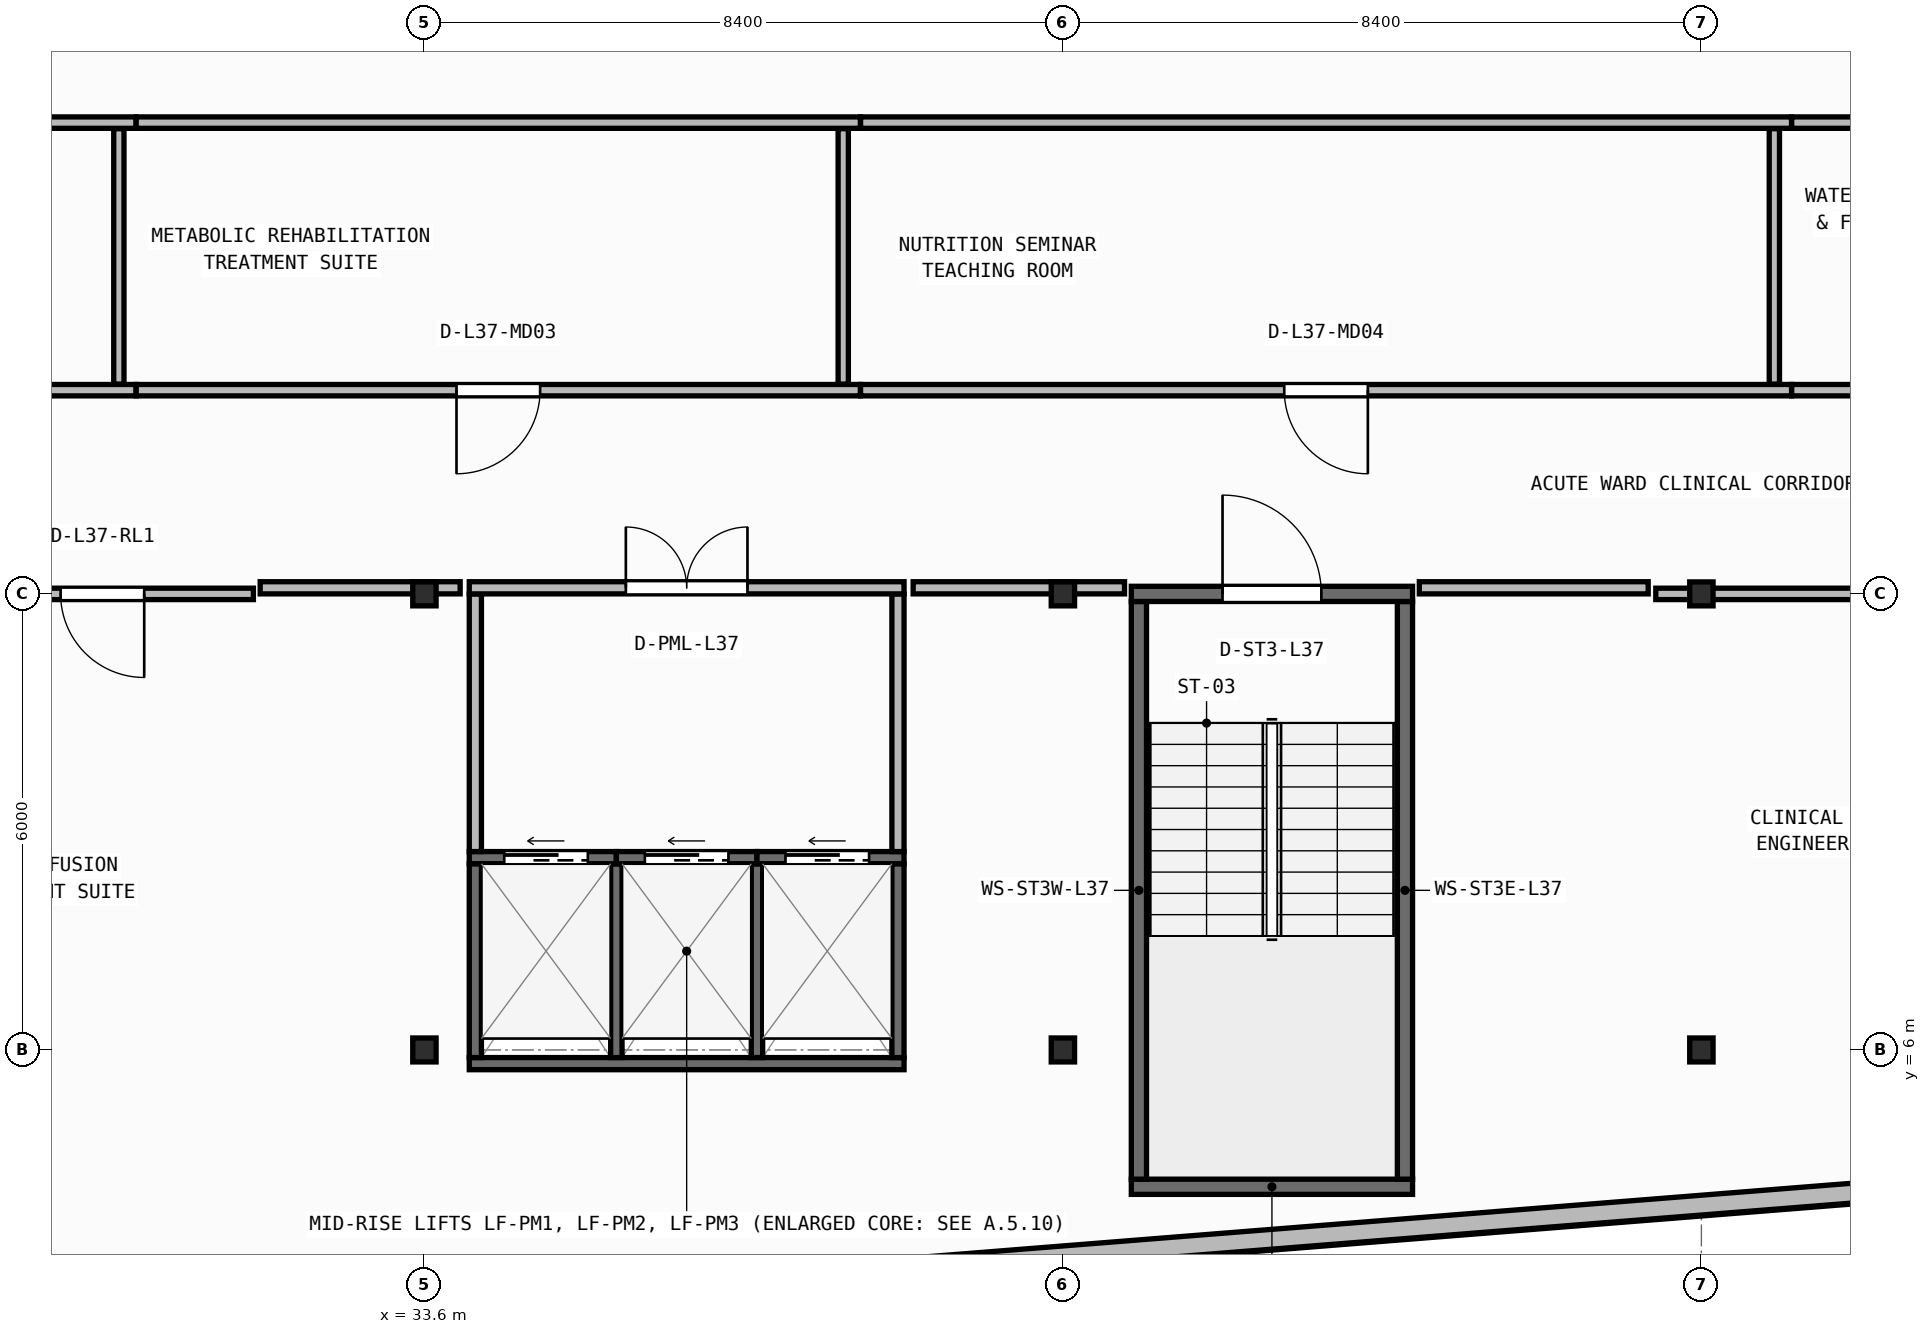
"""IFC4 building model, lengths in metres.
Left out: names, types, materials, properties, quantities, classifications, styles, units other than length and angle.
Written with IfcOpenShell. Run it as: python <this file> out.ifc"""

import sys

from ifc_helpers import new_model, si_unit, direction, frame, frame_2d, origin, origin_2d, place, context, subcontext, project, spatial, rectangle, i_section, extrude, element, fill, save


model = new_model("IFC4")
c1 = context("Model", 3, precision=1e-05, world=origin(), true_north=direction((0.0, 1.0)))
c2 = subcontext(c1, "Body", "Model", "MODEL_VIEW")
j1 = project(units=[si_unit("LENGTHUNIT", "METRE"), si_unit("PLANEANGLEUNIT", "RADIAN")], contexts=[c1])
p1 = place(None, origin())
s1 = spatial("IfcSite", under=j1, at=p1, CompositionType="ELEMENT")
p2 = place(p1, origin())
s2 = spatial("IfcBuilding", under=s1, at=p2, CompositionType="ELEMENT")
p3 = place(p2, frame((0.0, 0.0, 150.75)))
s3 = spatial("IfcBuildingStorey", under=s2, at=p3, CompositionType="ELEMENT", Elevation=150.75)
for number, where, z_axis, x_axis in (
    (1, (33.6, 6.0, 0.0), (0.0, 0.0, 1.0), (1.0, 0.0, 0.0)),
    (2, (42.0, 6.0, 0.0), (0.0, 0.0, 1.0), (1.0, 0.0, 0.0)),
    (3, (50.4, 6.0, 0.0), (0.0, 0.0, 1.0), (1.0, 0.0, 0.0)),
    (4, (33.6, 12.0, 0.0), (0.0, 0.0, 1.0), (1.0, 0.0, 0.0)),
    (5, (42.0, 12.0, 0.0), (0.0, 0.0, 1.0), (1.0, 0.0, 0.0)),
    (6, (50.4, 12.0, 0.0), (0.0, 0.0, 1.0), (1.0, 0.0, 0.0)),
):
    element("IfcColumn", number, at=place(p3, frame(where, z_axis=z_axis, x_axis=x_axis)), inside=s3, PredefinedType="COLUMN", context=c2, shape_type="SweptSolid", body=[
        extrude(i_section(OverallWidth=0.307, OverallDepth=0.315, WebThickness=0.012, FlangeThickness=0.019, FilletRadius=0.017, at=origin_2d()), origin(), (0.0, 0.0, 1.0), 3.95),
    ])
p4 = place(p3, frame((2.76, 0.173, 0.0), z_axis=(0.0, 0.0, 1.0), x_axis=(0.996857931723, 0.079210251617, 0.0)))
e7 = element("IfcWall", 7, at=p4, inside=s3, PredefinedType="STANDARD", context=c2, shape_type="SweptSolid", body=[
    extrude(rectangle(XDim=51.442, YDim=0.26, at=frame_2d((25.721, 0.0))), origin(), (0.0, 0.0, 1.0), 3.71),
])
p5 = place(p4, frame((24.521, 0.0, 0.9)))
e8 = element("IfcOpeningElement", 8, at=p5, cuts=e7, PredefinedType="OPENING", context=c2, shape_type="SweptSolid", body=[
    extrude(rectangle(XDim=2.4, YDim=1.65, at=frame_2d((1.2, 0.825))), frame((0.0, 0.14, 0.0), z_axis=(0.0, -1.0, 0.0), x_axis=(1.0, 0.0, 0.0)), (0.0, 0.0, 1.0), 0.28),
])
p6 = place(p3, frame((42.9, 4.2, 0.0), z_axis=(0.0, 0.0, 1.0), x_axis=(1.0, 0.0, 0.0)))
e9 = element("IfcWall", 9, at=p6, inside=s3, PredefinedType="SHEAR", context=c2, shape_type="SweptSolid", body=[
    extrude(rectangle(XDim=3.7, YDim=0.2, at=frame_2d((1.85, 0.0))), origin(), (0.0, 0.0, 1.0), 3.71),
])
for number, where, z_axis, x_axis in (
    (10, (43.0, 4.3, 0.0), (0.0, 0.0, 1.0), (0.0, 1.0, 0.0)),
    (11, (46.5, 4.3, 0.0), (0.0, 0.0, 1.0), (0.0, 1.0, 0.0)),
):
    element("IfcWall", number, at=place(p3, frame(where, z_axis=z_axis, x_axis=x_axis)), inside=s3, PredefinedType="SHEAR", context=c2, shape_type="SweptSolid", body=[
        extrude(rectangle(XDim=7.6, YDim=0.2, at=frame_2d((3.8, 0.0))), origin(), (0.0, 0.0, 1.0), 3.71),
    ])
p7 = place(p3, frame((42.9, 12.0, 0.0), z_axis=(0.0, 0.0, 1.0), x_axis=(1.0, 0.0, 0.0)))
e12 = element("IfcWall", 12, at=p7, inside=s3, PredefinedType="SHEAR", context=c2, shape_type="SweptSolid", body=[
    extrude(rectangle(XDim=3.7, YDim=0.2, at=frame_2d((1.85, 0.0))), origin(), (0.0, 0.0, 1.0), 3.71),
])
p8 = place(p7, frame((1.2, 0.0, 0.0)))
e13 = element("IfcOpeningElement", 13, at=p8, cuts=e12, PredefinedType="OPENING", context=c2, shape_type="SweptSolid", body=[
    extrude(rectangle(XDim=1.3, YDim=2.15, at=frame_2d((0.65, 1.075))), frame((0.0, 0.11, 0.0), z_axis=(0.0, -1.0, 0.0), x_axis=(1.0, 0.0, 0.0)), (0.0, 0.0, 1.0), 0.22),
])
p9 = place(p3, frame((34.19, 5.82, 0.0), z_axis=(0.0, 0.0, 1.0), x_axis=(1.0, 0.0, 0.0)))
e14 = element("IfcWall", 14, at=p9, inside=s3, PredefinedType="SHEAR", context=c2, shape_type="SweptSolid", body=[
    extrude(rectangle(XDim=5.72, YDim=0.16, at=frame_2d((2.86, 0.0))), origin(), (0.0, 0.0, 1.0), 3.71),
])
for number, where, z_axis, x_axis in (
    (15, (34.27, 5.9, 0.0), (0.0, 0.0, 1.0), (0.0, 1.0, 0.0)),
    (16, (39.83, 5.9, 0.0), (0.0, 0.0, 1.0), (0.0, 1.0, 0.0)),
):
    element("IfcWall", number, at=place(p3, frame(where, z_axis=z_axis, x_axis=x_axis)), inside=s3, PredefinedType="SHEAR", context=c2, shape_type="SweptSolid", body=[
        extrude(rectangle(XDim=2.55, YDim=0.16, at=frame_2d((1.275, 0.0))), origin(), (0.0, 0.0, 1.0), 3.71),
    ])
for number, where, z_axis, x_axis in (
    (17, (36.125, 5.9, 0.0), (0.0, 0.0, 1.0), (0.0, 1.0, 0.0)),
    (18, (37.975, 5.9, 0.0), (0.0, 0.0, 1.0), (0.0, 1.0, 0.0)),
):
    element("IfcWall", number, at=place(p3, frame(where, z_axis=z_axis, x_axis=x_axis)), inside=s3, PredefinedType="SHEAR", context=c2, shape_type="SweptSolid", body=[
        extrude(rectangle(XDim=2.55, YDim=0.15, at=frame_2d((1.275, 0.0))), origin(), (0.0, 0.0, 1.0), 3.71),
    ])
p10 = place(p3, frame((34.19, 8.53, 0.0), z_axis=(0.0, 0.0, 1.0), x_axis=(1.0, 0.0, 0.0)))
e19 = element("IfcWall", 19, at=p10, inside=s3, PredefinedType="SHEAR", context=c2, shape_type="SweptSolid", body=[
    extrude(rectangle(XDim=1.935, YDim=0.16, at=frame_2d((0.968, 0.0))), origin(), (0.0, 0.0, 1.0), 3.71),
])
p11 = place(p10, frame((0.46, 0.0, 0.0)))
e20 = element("IfcOpeningElement", 20, at=p11, cuts=e19, PredefinedType="OPENING", context=c2, shape_type="SweptSolid", body=[
    extrude(rectangle(XDim=1.1, YDim=2.15, at=frame_2d((0.55, 1.075))), frame((0.0, 0.09, 0.0), z_axis=(0.0, -1.0, 0.0), x_axis=(1.0, 0.0, 0.0)), (0.0, 0.0, 1.0), 0.18),
])
p12 = place(p3, frame((36.125, 8.53, 0.0), z_axis=(0.0, 0.0, 1.0), x_axis=(1.0, 0.0, 0.0)))
e21 = element("IfcWall", 21, at=p12, inside=s3, PredefinedType="SHEAR", context=c2, shape_type="SweptSolid", body=[
    extrude(rectangle(XDim=1.85, YDim=0.16, at=frame_2d((0.925, 0.0))), origin(), (0.0, 0.0, 1.0), 3.71),
])
p13 = place(p12, frame((0.375, 0.0, 0.0)))
e22 = element("IfcOpeningElement", 22, at=p13, cuts=e21, PredefinedType="OPENING", context=c2, shape_type="SweptSolid", body=[
    extrude(rectangle(XDim=1.1, YDim=2.15, at=frame_2d((0.55, 1.075))), frame((0.0, 0.09, 0.0), z_axis=(0.0, -1.0, 0.0), x_axis=(1.0, 0.0, 0.0)), (0.0, 0.0, 1.0), 0.18),
])
p14 = place(p3, frame((37.975, 8.53, 0.0), z_axis=(0.0, 0.0, 1.0), x_axis=(1.0, 0.0, 0.0)))
e23 = element("IfcWall", 23, at=p14, inside=s3, PredefinedType="SHEAR", context=c2, shape_type="SweptSolid", body=[
    extrude(rectangle(XDim=1.935, YDim=0.16, at=frame_2d((0.967, 0.0))), origin(), (0.0, 0.0, 1.0), 3.71),
])
p15 = place(p14, frame((0.375, 0.0, 0.0)))
e24 = element("IfcOpeningElement", 24, at=p15, cuts=e23, PredefinedType="OPENING", context=c2, shape_type="SweptSolid", body=[
    extrude(rectangle(XDim=1.1, YDim=2.15, at=frame_2d((0.55, 1.075))), frame((0.0, 0.09, 0.0), z_axis=(0.0, -1.0, 0.0), x_axis=(1.0, 0.0, 0.0)), (0.0, 0.0, 1.0), 0.18),
])
for number, where, z_axis, x_axis in (
    (25, (34.27, 8.61, 0.0), (0.0, 0.0, 1.0), (0.0, 1.0, 0.0)),
    (26, (39.83, 8.61, 0.0), (0.0, 0.0, 1.0), (0.0, 1.0, 0.0)),
):
    element("IfcWall", number, at=place(p3, frame(where, z_axis=z_axis, x_axis=x_axis)), inside=s3, PredefinedType="PARTITIONING", context=c2, shape_type="SweptSolid", body=[
        extrude(rectangle(XDim=3.39, YDim=0.16, at=frame_2d((1.695, 0.0))), origin(), (0.0, 0.0, 1.0), 3.71),
    ])
p16 = place(p3, frame((34.19, 12.08, 0.0), z_axis=(0.0, 0.0, 1.0), x_axis=(1.0, 0.0, 0.0)))
e27 = element("IfcWall", 27, at=p16, inside=s3, PredefinedType="PARTITIONING", context=c2, shape_type="SweptSolid", body=[
    extrude(rectangle(XDim=5.72, YDim=0.16, at=frame_2d((2.86, 0.0))), origin(), (0.0, 0.0, 1.0), 3.083),
])
p17 = place(p16, frame((2.06, 0.0, 0.0)))
e28 = element("IfcOpeningElement", 28, at=p17, cuts=e27, PredefinedType="OPENING", context=c2, shape_type="SweptSolid", body=[
    extrude(rectangle(XDim=1.6, YDim=2.05, at=frame_2d((0.8, 1.025))), frame((0.0, 0.09, 0.0), z_axis=(0.0, -1.0, 0.0), x_axis=(1.0, 0.0, 0.0)), (0.0, 0.0, 1.0), 0.18),
])
p18 = place(p3, frame((31.35, 12.0, 0.0), z_axis=(0.0, 0.0, 1.0), x_axis=(-1.0, 0.0, 0.0)))
e29 = element("IfcWall", 29, at=p18, inside=s3, PredefinedType="PARTITIONING", context=c2, shape_type="SweptSolid", body=[
    extrude(rectangle(XDim=5.997, YDim=0.15, at=frame_2d((2.998, 0.0))), origin(), (0.0, 0.0, 1.0), 3.083),
])
p19 = place(p18, frame((1.437, 0.0, 0.0)))
e30 = element("IfcOpeningElement", 30, at=p19, cuts=e29, PredefinedType="OPENING", context=c2, shape_type="SweptSolid", body=[
    extrude(rectangle(XDim=1.1, YDim=2.1, at=frame_2d((0.55, 1.05))), frame((0.0, 0.085, 0.0), z_axis=(0.0, -1.0, 0.0), x_axis=(1.0, 0.0, 0.0)), (0.0, 0.0, 1.0), 0.17),
])
p20 = place(p3, frame((56.52, 12.0, 0.0), z_axis=(0.0, 0.0, 1.0), x_axis=(-1.0, 0.0, 0.0)))
e31 = element("IfcWall", 31, at=p20, inside=s3, PredefinedType="PARTITIONING", context=c2, shape_type="SweptSolid", body=[
    extrude(rectangle(XDim=6.72, YDim=0.15, at=frame_2d((3.36, 0.0))), origin(), (0.0, 0.0, 1.0), 3.083),
])
p21 = place(p20, frame((0.331, 0.0, 0.0)))
e32 = element("IfcOpeningElement", 32, at=p21, cuts=e31, PredefinedType="OPENING", context=c2, shape_type="SweptSolid", body=[
    extrude(rectangle(XDim=1.1, YDim=2.1, at=frame_2d((0.55, 1.05))), frame((0.0, 0.085, 0.0), z_axis=(0.0, -1.0, 0.0), x_axis=(1.0, 0.0, 0.0)), (0.0, 0.0, 1.0), 0.17),
])
p22 = place(p3, frame((29.806, 14.68, 0.0), z_axis=(0.0, 0.0, 1.0), x_axis=(-1.0, 0.0, 0.0)))
e33 = element("IfcWall", 33, at=p22, inside=s3, PredefinedType="PARTITIONING", context=c2, shape_type="SweptSolid", body=[
    extrude(rectangle(XDim=8.252, YDim=0.15, at=frame_2d((4.126, 0.0))), origin(), (0.0, 0.0, 1.0), 3.71),
])
p23 = place(p22, frame((3.576, 0.0, 0.0)))
e34 = element("IfcOpeningElement", 34, at=p23, cuts=e33, PredefinedType="OPENING", context=c2, shape_type="SweptSolid", body=[
    extrude(rectangle(XDim=1.1, YDim=2.1, at=frame_2d((0.55, 1.05))), frame((0.0, 0.085, 0.0), z_axis=(0.0, -1.0, 0.0), x_axis=(1.0, 0.0, 0.0)), (0.0, 0.0, 1.0), 0.17),
])
p24 = place(p3, frame((39.336, 14.68, 0.0), z_axis=(0.0, 0.0, 1.0), x_axis=(-1.0, 0.0, 0.0)))
e35 = element("IfcWall", 35, at=p24, inside=s3, PredefinedType="PARTITIONING", context=c2, shape_type="SweptSolid", body=[
    extrude(rectangle(XDim=9.528, YDim=0.15, at=frame_2d((4.764, 0.0))), origin(), (0.0, 0.0, 1.0), 3.71),
])
p25 = place(p24, frame((4.214, 0.0, 0.0)))
e36 = element("IfcOpeningElement", 36, at=p25, cuts=e35, PredefinedType="OPENING", context=c2, shape_type="SweptSolid", body=[
    extrude(rectangle(XDim=1.1, YDim=2.1, at=frame_2d((0.55, 1.05))), frame((0.0, 0.085, 0.0), z_axis=(0.0, -1.0, 0.0), x_axis=(1.0, 0.0, 0.0)), (0.0, 0.0, 1.0), 0.17),
])
p26 = place(p3, frame((51.586, 14.68, 0.0), z_axis=(0.0, 0.0, 1.0), x_axis=(-1.0, 0.0, 0.0)))
e37 = element("IfcWall", 37, at=p26, inside=s3, PredefinedType="PARTITIONING", context=c2, shape_type="SweptSolid", body=[
    extrude(rectangle(XDim=12.248, YDim=0.15, at=frame_2d((6.124, 0.0))), origin(), (0.0, 0.0, 1.0), 3.71),
])
p27 = place(p26, frame((5.574, 0.0, 0.0)))
e38 = element("IfcOpeningElement", 38, at=p27, cuts=e37, PredefinedType="OPENING", context=c2, shape_type="SweptSolid", body=[
    extrude(rectangle(XDim=1.1, YDim=2.1, at=frame_2d((0.55, 1.05))), frame((0.0, 0.085, 0.0), z_axis=(0.0, -1.0, 0.0), x_axis=(1.0, 0.0, 0.0)), (0.0, 0.0, 1.0), 0.17),
])
p28 = place(p3, frame((56.52, 14.68, 0.0), z_axis=(0.0, 0.0, 1.0), x_axis=(-1.0, 0.0, 0.0)))
e39 = element("IfcWall", 39, at=p28, inside=s3, PredefinedType="PARTITIONING", context=c2, shape_type="SweptSolid", body=[
    extrude(rectangle(XDim=4.932, YDim=0.15, at=frame_2d((2.466, 0.0))), origin(), (0.0, 0.0, 1.0), 3.71),
])
p29 = place(p28, frame((1.916, 0.0, 0.0)))
e40 = element("IfcOpeningElement", 40, at=p29, cuts=e39, PredefinedType="OPENING", context=c2, shape_type="SweptSolid", body=[
    extrude(rectangle(XDim=1.1, YDim=2.1, at=frame_2d((0.55, 1.05))), frame((0.0, 0.085, 0.0), z_axis=(0.0, -1.0, 0.0), x_axis=(1.0, 0.0, 0.0)), (0.0, 0.0, 1.0), 0.17),
])
p30 = place(p3, frame((21.72, 18.2, 0.0), z_axis=(0.0, 0.0, 1.0), x_axis=(1.0, 0.0, 0.0)))
e41 = element("IfcWall", 41, at=p30, inside=s3, PredefinedType="PARTITIONING", context=c2, shape_type="SweptSolid", body=[
    extrude(rectangle(XDim=8.086, YDim=0.15, at=frame_2d((4.043, 0.0))), origin(), (0.0, 0.0, 1.0), 3.71),
])
p31 = place(p3, frame((29.808, 18.2, 0.0), z_axis=(0.0, 0.0, 1.0), x_axis=(1.0, 0.0, 0.0)))
e42 = element("IfcWall", 42, at=p31, inside=s3, PredefinedType="PARTITIONING", context=c2, shape_type="SweptSolid", body=[
    extrude(rectangle(XDim=9.528, YDim=0.15, at=frame_2d((4.764, 0.0))), origin(), (0.0, 0.0, 1.0), 3.71),
])
p32 = place(p3, frame((39.338, 18.2, 0.0), z_axis=(0.0, 0.0, 1.0), x_axis=(1.0, 0.0, 0.0)))
e43 = element("IfcWall", 43, at=p32, inside=s3, PredefinedType="PARTITIONING", context=c2, shape_type="SweptSolid", body=[
    extrude(rectangle(XDim=12.248, YDim=0.15, at=frame_2d((6.124, 0.0))), origin(), (0.0, 0.0, 1.0), 3.71),
])
p33 = place(p3, frame((51.588, 18.2, 0.0), z_axis=(0.0, 0.0, 1.0), x_axis=(1.0, 0.0, 0.0)))
e44 = element("IfcWall", 44, at=p33, inside=s3, PredefinedType="PARTITIONING", context=c2, shape_type="SweptSolid", body=[
    extrude(rectangle(XDim=4.932, YDim=0.15, at=frame_2d((2.466, 0.0))), origin(), (0.0, 0.0, 1.0), 3.71),
])
for number, where, z_axis, x_axis in (
    (45, (29.58, 14.76, 0.0), (0.0, 0.0, 1.0), (0.0, 1.0, 0.0)),
    (46, (39.11, 14.76, 0.0), (0.0, 0.0, 1.0), (0.0, 1.0, 0.0)),
    (47, (51.36, 14.76, 0.0), (0.0, 0.0, 1.0), (0.0, 1.0, 0.0)),
):
    element("IfcWall", number, at=place(p3, frame(where, z_axis=z_axis, x_axis=x_axis)), inside=s3, PredefinedType="PARTITIONING", context=c2, shape_type="SweptSolid", body=[
        extrude(rectangle(XDim=3.36, YDim=0.135, at=frame_2d((1.68, 0.0))), origin(), (0.0, 0.0, 1.0), 3.71),
    ])
p34 = place(p3, frame((31.439, 12.08, 0.0), z_axis=(0.0, 0.0, 1.0), x_axis=(1.0, 0.0, 0.0)))
e48 = element("IfcWall", 48, at=p34, inside=s3, PredefinedType="PARTITIONING", context=c2, shape_type="SweptSolid", body=[
    extrude(rectangle(XDim=2.631, YDim=0.16, at=frame_2d((1.315, 0.0))), origin(), (0.0, 0.0, 1.0), 3.083),
])
p35 = place(p3, frame((40.03, 12.08, 0.0), z_axis=(0.0, 0.0, 1.0), x_axis=(1.0, 0.0, 0.0)))
e49 = element("IfcWall", 49, at=p35, inside=s3, PredefinedType="PARTITIONING", context=c2, shape_type="SweptSolid", body=[
    extrude(rectangle(XDim=2.781, YDim=0.16, at=frame_2d((1.39, 0.0))), origin(), (0.0, 0.0, 1.0), 3.083),
])
p36 = place(p3, frame((46.689, 12.08, 0.0), z_axis=(0.0, 0.0, 1.0), x_axis=(1.0, 0.0, 0.0)))
e50 = element("IfcWall", 50, at=p36, inside=s3, PredefinedType="PARTITIONING", context=c2, shape_type="SweptSolid", body=[
    extrude(rectangle(XDim=3.011, YDim=0.16, at=frame_2d((1.505, 0.0))), origin(), (0.0, 0.0, 1.0), 3.083),
])
p37 = place(p8, origin())
e51 = element("IfcDoor", 51, at=p37, inside=s3, OperationType="SINGLE_SWING_LEFT", PredefinedType="DOOR", context=c2, shape_type="SweptSolid", body=[
    extrude(rectangle(XDim=1.3, YDim=2.15, at=frame_2d((0.65, 1.075))), frame((0.0, 0.025, 0.0), z_axis=(0.0, -1.0, 0.0), x_axis=(1.0, 0.0, 0.0)), (0.0, 0.0, 1.0), 0.05),
])
fill(e13, e51)
p38 = place(p11, origin())
e52 = element("IfcDoor", 52, at=p38, inside=s3, OperationType="SLIDING_TO_LEFT", PredefinedType="DOOR", context=c2, shape_type="SweptSolid", body=[
    extrude(rectangle(XDim=1.1, YDim=2.15, at=frame_2d((0.55, 1.075))), frame((0.0, 0.025, 0.0), z_axis=(0.0, -1.0, 0.0), x_axis=(1.0, 0.0, 0.0)), (0.0, 0.0, 1.0), 0.05),
])
fill(e20, e52)
p39 = place(p13, origin())
e53 = element("IfcDoor", 53, at=p39, inside=s3, OperationType="SLIDING_TO_LEFT", PredefinedType="DOOR", context=c2, shape_type="SweptSolid", body=[
    extrude(rectangle(XDim=1.1, YDim=2.15, at=frame_2d((0.55, 1.075))), frame((0.0, 0.025, 0.0), z_axis=(0.0, -1.0, 0.0), x_axis=(1.0, 0.0, 0.0)), (0.0, 0.0, 1.0), 0.05),
])
fill(e22, e53)
p40 = place(p15, origin())
e54 = element("IfcDoor", 54, at=p40, inside=s3, OperationType="SLIDING_TO_LEFT", PredefinedType="DOOR", context=c2, shape_type="SweptSolid", body=[
    extrude(rectangle(XDim=1.1, YDim=2.15, at=frame_2d((0.55, 1.075))), frame((0.0, 0.025, 0.0), z_axis=(0.0, -1.0, 0.0), x_axis=(1.0, 0.0, 0.0)), (0.0, 0.0, 1.0), 0.05),
])
fill(e24, e54)
p41 = place(p17, origin())
e55 = element("IfcDoor", 55, at=p41, inside=s3, OperationType="DOUBLE_DOOR_SINGLE_SWING", PredefinedType="DOOR", context=c2, shape_type="SweptSolid", body=[
    extrude(rectangle(XDim=1.6, YDim=2.05, at=frame_2d((0.8, 1.025))), frame((0.0, 0.025, 0.0), z_axis=(0.0, -1.0, 0.0), x_axis=(1.0, 0.0, 0.0)), (0.0, 0.0, 1.0), 0.05),
])
fill(e28, e55)
p42 = place(p19, origin())
e56 = element("IfcDoor", 56, at=p42, inside=s3, OperationType="SINGLE_SWING_LEFT", PredefinedType="DOOR", context=c2, shape_type="SweptSolid", body=[
    extrude(rectangle(XDim=1.1, YDim=2.1, at=frame_2d((0.55, 1.05))), frame((0.0, 0.025, 0.0), z_axis=(0.0, -1.0, 0.0), x_axis=(1.0, 0.0, 0.0)), (0.0, 0.0, 1.0), 0.05),
])
fill(e30, e56)
p43 = place(p25, origin())
e57 = element("IfcDoor", 57, at=p43, inside=s3, OperationType="SINGLE_SWING_RIGHT", PredefinedType="DOOR", context=c2, shape_type="SweptSolid", body=[
    extrude(rectangle(XDim=1.1, YDim=2.1, at=frame_2d((0.55, 1.05))), frame((0.0, 0.025, 0.0), z_axis=(0.0, -1.0, 0.0), x_axis=(1.0, 0.0, 0.0)), (0.0, 0.0, 1.0), 0.05),
])
fill(e36, e57)
p44 = place(p27, origin())
e58 = element("IfcDoor", 58, at=p44, inside=s3, OperationType="SINGLE_SWING_LEFT", PredefinedType="DOOR", context=c2, shape_type="SweptSolid", body=[
    extrude(rectangle(XDim=1.1, YDim=2.1, at=frame_2d((0.55, 1.05))), frame((0.0, 0.025, 0.0), z_axis=(0.0, -1.0, 0.0), x_axis=(1.0, 0.0, 0.0)), (0.0, 0.0, 1.0), 0.05),
])
fill(e38, e58)
save(model, sys.argv[1])
